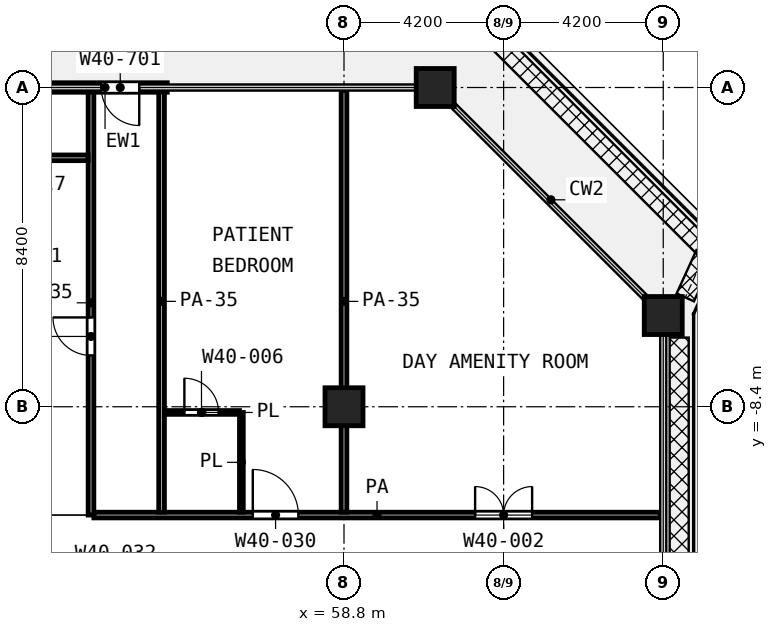
"""IFC4 building model, lengths in metres.
Left out: names, types, materials, properties, quantities, classifications, styles, units other than length and angle.
Written with IfcOpenShell. Run it as: python <this file> out.ifc"""

import sys

from ifc_helpers import new_model, si_unit, direction, frame, frame_2d, origin, origin_2d, place, context, subcontext, project, spatial, rectangle, extrude, element, fill, save


model = new_model("IFC4")
c1 = context("Model", 3, precision=1e-05, world=origin(), true_north=direction((0.0, 1.0)))
c2 = subcontext(c1, "Body", "Model", "MODEL_VIEW")
j1 = project(units=[si_unit("LENGTHUNIT", "METRE"), si_unit("PLANEANGLEUNIT", "RADIAN")], contexts=[c1])
p1 = place(None, origin())
s1 = spatial("IfcSite", under=j1, at=p1, CompositionType="ELEMENT")
p2 = place(p1, origin())
s2 = spatial("IfcBuilding", under=s1, at=p2, CompositionType="ELEMENT")
p3 = place(p2, frame((0.0, 0.0, 196.2)))
s3 = spatial("IfcBuildingStorey", under=s2, at=p3, CompositionType="ELEMENT", Elevation=196.2)
for number, where, z_axis, x_axis in (
    (1, (61.2, 0.0, 0.0), (0.0, 0.0, 1.0), (1.0, 0.0, 0.0)),
    (2, (67.2, -6.0, 0.0), (0.0, 0.0, 1.0), (1.0, 0.0, 0.0)),
    (3, (58.8, -8.4, 0.0), (0.0, 0.0, 1.0), (1.0, 0.0, 0.0)),
):
    element("IfcColumn", number, at=place(p3, frame(where, z_axis=z_axis, x_axis=x_axis)), inside=s3, PredefinedType="COLUMN", context=c2, shape_type="SweptSolid", body=[
        extrude(rectangle(XDim=1.0, YDim=1.0, at=origin_2d()), origin(), (0.0, 0.0, 1.0), 4.2),
    ])
p4 = place(p3, frame((54.15, 0.0, 0.0), z_axis=(0.0, 0.0, 1.0), x_axis=(-1.0, 0.0, 0.0)))
e4 = element("IfcWall", 4, at=p4, inside=s3, PredefinedType="SOLIDWALL", context=c2, shape_type="SweptSolid", body=[
    extrude(rectangle(XDim=3.275, YDim=0.25, at=frame_2d((1.637, 0.0))), origin(), (0.0, 0.0, 1.0), 2.58),
])
p5 = place(p4, frame((0.738, 0.0, 0.0)))
e5 = element("IfcOpeningElement", 5, at=p5, cuts=e4, PredefinedType="OPENING", context=c2, shape_type="SweptSolid", body=[
    extrude(rectangle(XDim=1.0, YDim=2.1, at=frame_2d((0.5, 1.05))), frame((0.0, 0.135, 0.0), z_axis=(0.0, -1.0, 0.0), x_axis=(1.0, 0.0, 0.0)), (0.0, 0.0, 1.0), 0.27),
])
p6 = place(p3, frame((54.075, -8.55, 0.0), z_axis=(0.0, 0.0, 1.0), x_axis=(1.0, 0.0, 0.0)))
e6 = element("IfcWall", 6, at=p6, inside=s3, PredefinedType="PARTITIONING", context=c2, shape_type="SweptSolid", body=[
    extrude(rectangle(XDim=1.975, YDim=0.1, at=frame_2d((0.988, 0.0))), origin(), (0.0, 0.0, 1.0), 3.6),
])
p7 = place(p6, frame((0.525, 0.0, 0.0)))
e7 = element("IfcOpeningElement", 7, at=p7, cuts=e6, PredefinedType="OPENING", context=c2, shape_type="SweptSolid", body=[
    extrude(rectangle(XDim=0.9, YDim=2.1, at=frame_2d((0.45, 1.05))), frame((0.0, 0.06, 0.0), z_axis=(0.0, -1.0, 0.0), x_axis=(1.0, 0.0, 0.0)), (0.0, 0.0, 1.0), 0.12),
])
p8 = place(p3, frame((56.1, -11.175, 0.0), z_axis=(0.0, 0.0, 1.0), x_axis=(0.0, 1.0, 0.0)))
e8 = element("IfcWall", 8, at=p8, inside=s3, PredefinedType="PARTITIONING", context=c2, shape_type="SweptSolid", body=[
    extrude(rectangle(XDim=2.625, YDim=0.1, at=frame_2d((1.312, 0.0))), origin(), (0.0, 0.0, 1.0), 3.6),
])
p9 = place(p3, frame((52.218, -11.25, 0.0), z_axis=(0.0, 0.0, 1.0), x_axis=(1.0, 0.0, 0.0)))
e9 = element("IfcWall", 9, at=p9, inside=s3, PredefinedType="PARTITIONING", context=c2, shape_type="SweptSolid", body=[
    extrude(rectangle(XDim=14.902, YDim=0.15, at=frame_2d((7.451, 0.0))), origin(), (0.0, 0.0, 1.0), 3.6),
])
p10 = place(p9, frame((4.182, 0.0, 0.0)))
e10 = element("IfcOpeningElement", 10, at=p10, cuts=e9, PredefinedType="OPENING", context=c2, shape_type="SweptSolid", body=[
    extrude(rectangle(XDim=1.2, YDim=2.1, at=frame_2d((0.6, 1.05))), frame((0.0, 0.085, 0.0), z_axis=(0.0, -1.0, 0.0), x_axis=(1.0, 0.0, 0.0)), (0.0, 0.0, 1.0), 0.17),
])
p11 = place(p9, frame((10.032, 0.0, 0.0)))
e11 = element("IfcOpeningElement", 11, at=p11, cuts=e9, PredefinedType="OPENING", context=c2, shape_type="SweptSolid", body=[
    extrude(rectangle(XDim=1.5, YDim=2.1, at=frame_2d((0.75, 1.05))), frame((0.0, 0.085, 0.0), z_axis=(0.0, -1.0, 0.0), x_axis=(1.0, 0.0, 0.0)), (0.0, 0.0, 1.0), 0.17),
])
p12 = place(p3, frame((48.63, -1.85, 0.0), z_axis=(0.0, 0.0, 1.0), x_axis=(1.0, 0.0, 0.0)))
e12 = element("IfcWall", 12, at=p12, inside=s3, PredefinedType="PARTITIONING", context=c2, shape_type="SweptSolid", body=[
    extrude(rectangle(XDim=3.438, YDim=0.15, at=frame_2d((1.719, 0.0))), origin(), (0.0, 0.0, 1.0), 3.6),
])
p13 = place(p12, frame((1.282, 0.0, 0.0)))
e13 = element("IfcOpeningElement", 13, at=p13, cuts=e12, PredefinedType="OPENING", context=c2, shape_type="SweptSolid", body=[
    extrude(rectangle(XDim=1.0, YDim=2.1, at=frame_2d((0.5, 1.05))), frame((0.0, 0.085, 0.0), z_axis=(0.0, -1.0, 0.0), x_axis=(1.0, 0.0, 0.0)), (0.0, 0.0, 1.0), 0.17),
])
p14 = place(p3, frame((52.143, -11.25, 0.0), z_axis=(0.0, 0.0, 1.0), x_axis=(0.0, 1.0, 0.0)))
e14 = element("IfcWall", 14, at=p14, inside=s3, PredefinedType="PARTITIONING", context=c2, shape_type="SweptSolid", body=[
    extrude(rectangle(XDim=11.17, YDim=0.15, at=frame_2d((5.585, 0.0))), origin(), (0.0, 0.0, 1.0), 2.7),
])
p15 = place(p14, frame((4.2, 0.0, 0.0)))
e15 = element("IfcOpeningElement", 15, at=p15, cuts=e14, PredefinedType="OPENING", context=c2, shape_type="SweptSolid", body=[
    extrude(rectangle(XDim=1.0, YDim=2.1, at=frame_2d((0.5, 1.05))), frame((0.0, 0.085, 0.0), z_axis=(0.0, -1.0, 0.0), x_axis=(1.0, 0.0, 0.0)), (0.0, 0.0, 1.0), 0.17),
])
for number, where, z_axis, x_axis in (
    (16, (54.0, -11.175, 0.0), (0.0, 0.0, 1.0), (0.0, 1.0, 0.0)),
    (17, (58.8, -11.175, 0.0), (0.0, 0.0, 1.0), (0.0, 1.0, 0.0)),
):
    element("IfcWall", number, at=place(p3, frame(where, z_axis=z_axis, x_axis=x_axis)), inside=s3, PredefinedType="PARTITIONING", context=c2, shape_type="SweptSolid", body=[
        extrude(rectangle(XDim=11.095, YDim=0.15, at=frame_2d((5.547, 0.0))), origin(), (0.0, 0.0, 1.0), 2.7),
    ])
p16 = place(p5, origin())
e18 = element("IfcDoor", 18, at=p16, inside=s3, OperationType="SINGLE_SWING_LEFT", PredefinedType="DOOR", context=c2, shape_type="SweptSolid", body=[
    extrude(rectangle(XDim=1.0, YDim=2.1, at=frame_2d((0.5, 1.05))), frame((0.0, 0.025, 0.0), z_axis=(0.0, -1.0, 0.0), x_axis=(1.0, 0.0, 0.0)), (0.0, 0.0, 1.0), 0.05),
])
fill(e5, e18)
p17 = place(p15, origin())
e19 = element("IfcDoor", 19, at=p17, inside=s3, OperationType="SINGLE_SWING_RIGHT", PredefinedType="DOOR", context=c2, shape_type="SweptSolid", body=[
    extrude(rectangle(XDim=1.0, YDim=2.1, at=frame_2d((0.5, 1.05))), frame((0.0, 0.025, 0.0), z_axis=(0.0, -1.0, 0.0), x_axis=(1.0, 0.0, 0.0)), (0.0, 0.0, 1.0), 0.05),
])
fill(e15, e19)
p18 = place(p10, origin())
e20 = element("IfcDoor", 20, at=p18, inside=s3, OperationType="SINGLE_SWING_LEFT", PredefinedType="DOOR", context=c2, shape_type="SweptSolid", body=[
    extrude(rectangle(XDim=1.2, YDim=2.1, at=frame_2d((0.6, 1.05))), frame((0.0, 0.025, 0.0), z_axis=(0.0, -1.0, 0.0), x_axis=(1.0, 0.0, 0.0)), (0.0, 0.0, 1.0), 0.05),
])
fill(e10, e20)
p19 = place(p7, origin())
e21 = element("IfcDoor", 21, at=p19, inside=s3, OperationType="SINGLE_SWING_LEFT", PredefinedType="DOOR", context=c2, shape_type="SweptSolid", body=[
    extrude(rectangle(XDim=0.9, YDim=2.1, at=frame_2d((0.45, 1.05))), frame((0.0, 0.025, 0.0), z_axis=(0.0, -1.0, 0.0), x_axis=(1.0, 0.0, 0.0)), (0.0, 0.0, 1.0), 0.05),
])
fill(e7, e21)
p20 = place(p11, origin())
e22 = element("IfcDoor", 22, at=p20, inside=s3, OperationType="DOUBLE_DOOR_SINGLE_SWING", PredefinedType="DOOR", context=c2, shape_type="SweptSolid", body=[
    extrude(rectangle(XDim=1.5, YDim=2.1, at=frame_2d((0.75, 1.05))), frame((0.0, 0.025, 0.0), z_axis=(0.0, -1.0, 0.0), x_axis=(1.0, 0.0, 0.0)), (0.0, 0.0, 1.0), 0.05),
])
fill(e11, e22)
save(model, sys.argv[1])
